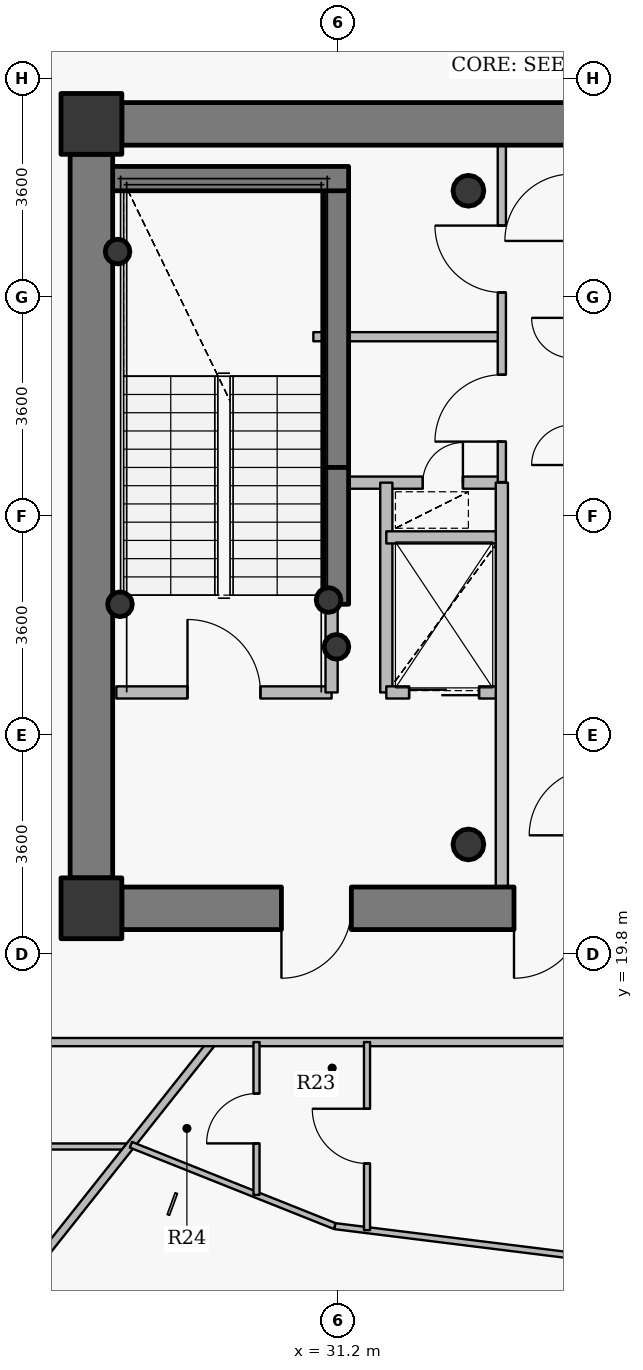
"""IFC4 building model, lengths in metres.
Left out: names, types, materials, properties, quantities, classifications, styles, units other than length and angle.
Written with IfcOpenShell. Run it as: python <this file> out.ifc"""

import sys

from ifc_helpers import new_model, si_unit, direction, frame, frame_2d, origin, origin_2d, place, context, subcontext, project, spatial, rectangle, hollow_circle, extrude, source, transform, mapped, element, fill, save


model = new_model("IFC4")
c1 = context("Model", 3, precision=1e-05, world=origin(), true_north=direction((0.0, 1.0)))
c2 = subcontext(c1, "Body", "Model", "MODEL_VIEW")
j1 = project(units=[si_unit("LENGTHUNIT", "METRE"), si_unit("PLANEANGLEUNIT", "RADIAN")], contexts=[c1])
p1 = place(None, origin())
s1 = spatial("IfcSite", under=j1, at=p1, CompositionType="ELEMENT")
p2 = place(p1, origin())
s2 = spatial("IfcBuilding", under=s1, at=p2, CompositionType="ELEMENT")
p3 = place(p2, frame((0.0, 0.0, 273.0)))
s3 = spatial("IfcBuildingStorey", under=s2, at=p3, CompositionType="ELEMENT", Elevation=273.0)
for number, where, z_axis, x_axis in (
    (1, (27.15, 20.55, 0.0), (0.0, 0.0, 1.0), (1.0, 0.0, 0.0)),
    (2, (27.15, 33.45, 0.0), (0.0, 0.0, 1.0), (1.0, 0.0, 0.0)),
):
    element("IfcColumn", number, at=place(p3, frame(where, z_axis=z_axis, x_axis=x_axis)), inside=s3, PredefinedType="COLUMN", context=c2, shape_type="SweptSolid", body=[
        extrude(rectangle(XDim=1.0, YDim=1.0, at=origin_2d()), origin(), (0.0, 0.0, 1.0), 3.75),
    ])
for number, where, z_axis, x_axis in (
    (3, (33.35, 21.6, 0.0), (0.0, 0.0, 1.0), (1.0, 0.0, 0.0)),
    (4, (33.35, 32.35, 0.0), (0.0, 0.0, 1.0), (1.0, 0.0, 0.0)),
):
    element("IfcColumn", number, at=place(p3, frame(where, z_axis=z_axis, x_axis=x_axis)), inside=s3, PredefinedType="COLUMN", context=c2, shape_type="SweptSolid", body=[
        extrude(hollow_circle(Radius=0.254, WallThickness=0.02, at=origin_2d()), origin(), (0.0, 0.0, 1.0), 3.75),
    ])
p4 = place(p3, frame((31.18, 27.8, 0.0), z_axis=(0.0, 0.0, 1.0), x_axis=(0.0, 1.0, 0.0)))
e5 = element("IfcWall", 5, at=p4, inside=s3, PredefinedType="SHEAR", context=c2, shape_type="SweptSolid", body=[
    extrude(rectangle(XDim=4.75, YDim=0.4, at=frame_2d((2.375, 0.0))), origin(), (0.0, 0.0, 1.0), 3.75),
])
p5 = place(p3, frame((27.25, 32.55, 0.0), z_axis=(0.0, 0.0, 1.0), x_axis=(1.0, 0.0, 0.0)))
e6 = element("IfcWall", 6, at=p5, inside=s3, PredefinedType="SHEAR", context=c2, shape_type="SweptSolid", body=[
    extrude(rectangle(XDim=4.13, YDim=0.4, at=frame_2d((2.065, 0.0))), origin(), (0.0, 0.0, 1.0), 3.75),
])
for number, where, z_axis, x_axis in (
    (7, (27.58, 31.35, 0.0), (0.0, 0.0, 1.0), (1.0, 0.0, 0.0)),
    (8, (31.05, 25.62, 0.0), (0.0, 0.0, 1.0), (1.0, 0.0, 0.0)),
    (9, (31.18, 24.85, 0.0), (0.0, 0.0, 1.0), (1.0, 0.0, 0.0)),
    (10, (27.62, 25.55, 0.0), (0.0, 0.0, 1.0), (1.0, 0.0, 0.0)),
):
    element("IfcColumn", number, at=place(p3, frame(where, z_axis=z_axis, x_axis=x_axis)), inside=s3, PredefinedType="COLUMN", context=c2, shape_type="SweptSolid", body=[
        extrude(hollow_circle(Radius=0.203, WallThickness=0.016, at=origin_2d()), origin(), (0.0, 0.0, 1.0), 3.75),
    ])
p6 = place(p3, frame((27.65, 33.45, 0.0), z_axis=(0.0, 0.0, 1.0), x_axis=(1.0, 0.0, 0.0)))
e11 = element("IfcWall", 11, at=p6, inside=s3, PredefinedType="SHEAR", context=c2, shape_type="SweptSolid", body=[
    extrude(rectangle(XDim=16.7, YDim=0.7, at=frame_2d((8.35, 0.0))), origin(), (0.0, 0.0, 1.0), 3.05),
])
p7 = place(p6, frame((12.775, 0.0, 0.0)))
e12 = element("IfcOpeningElement", 12, at=p7, cuts=e11, PredefinedType="OPENING", context=c2, shape_type="SweptSolid", body=[
    extrude(rectangle(XDim=1.15, YDim=2.15, at=origin_2d()), frame((0.575, 0.36, 1.075), z_axis=(0.0, -1.0, 0.0), x_axis=(1.0, 0.0, 0.0)), (0.0, 0.0, 1.0), 0.72),
])
p8 = place(p3, frame((44.35, 20.55, 0.0), z_axis=(0.0, 0.0, 1.0), x_axis=(-1.0, 0.0, 0.0)))
e13 = element("IfcWall", 13, at=p8, inside=s3, PredefinedType="SHEAR", context=c2, shape_type="SweptSolid", body=[
    extrude(rectangle(XDim=16.7, YDim=0.7, at=frame_2d((8.35, 0.0))), origin(), (0.0, 0.0, 1.0), 3.05),
])
p9 = place(p8, frame((12.925, 0.0, 0.0)))
e14 = element("IfcOpeningElement", 14, at=p9, cuts=e13, PredefinedType="OPENING", context=c2, shape_type="SweptSolid", body=[
    extrude(rectangle(XDim=1.15, YDim=2.15, at=origin_2d()), frame((0.575, 0.36, 1.075), z_axis=(0.0, -1.0, 0.0), x_axis=(1.0, 0.0, 0.0)), (0.0, 0.0, 1.0), 0.72),
])
p10 = place(p8, frame((9.1, 0.0, 0.0)))
e15 = element("IfcOpeningElement", 15, at=p10, cuts=e13, PredefinedType="OPENING", context=c2, shape_type="SweptSolid", body=[
    extrude(rectangle(XDim=1.15, YDim=2.15, at=origin_2d()), frame((0.575, 0.36, 1.075), z_axis=(0.0, -1.0, 0.0), x_axis=(1.0, 0.0, 0.0)), (0.0, 0.0, 1.0), 0.72),
])
p11 = place(p3, frame((27.15, 21.05, 0.0), z_axis=(0.0, 0.0, 1.0), x_axis=(0.0, 1.0, 0.0)))
e16 = element("IfcWall", 16, at=p11, inside=s3, PredefinedType="SHEAR", context=c2, shape_type="SweptSolid", body=[
    extrude(rectangle(XDim=11.9, YDim=0.7, at=frame_2d((5.95, 0.0))), origin(), (0.0, 0.0, 1.0), 3.05),
])
p12 = place(p3, frame((31.18, 25.55, 0.0), z_axis=(0.0, 0.0, 1.0), x_axis=(0.0, 1.0, 0.0)))
e17 = element("IfcWall", 17, at=p12, inside=s3, PredefinedType="SHEAR", context=c2, shape_type="SweptSolid", body=[
    extrude(rectangle(XDim=2.25, YDim=0.4, at=frame_2d((1.125, 0.0))), origin(), (0.0, 0.0, 1.0), 3.1),
])
p13 = place(p3, frame((18.118, 16.633, 0.0), z_axis=(0.0, 0.0, 1.0), x_axis=(1.0, 0.0, 0.0)))
e18 = element("IfcWall", 18, at=p13, inside=s3, PredefinedType="PARTITIONING", context=c2, shape_type="SweptSolid", body=[
    extrude(rectangle(XDim=9.659, YDim=0.1, at=frame_2d((4.83, 0.0))), origin(), (0.0, 0.0, 1.0), 2.985),
])
p14 = place(p13, frame((4.379, 0.0, 0.0)))
e19 = element("IfcOpeningElement", 19, at=p14, cuts=e18, PredefinedType="OPENING", context=c2, shape_type="SweptSolid", body=[
    extrude(rectangle(XDim=0.9, YDim=2.1, at=origin_2d()), frame((0.45, 0.06, 1.05), z_axis=(0.0, -1.0, 0.0), x_axis=(1.0, 0.0, 0.0)), (0.0, 0.0, 1.0), 0.12),
])
p15 = place(p3, frame((24.294, 12.242, 0.0), z_axis=(0.0, 0.0, 1.0), x_axis=(0.621439784824, 0.783461928774, 0.0)))
e20 = element("IfcWall", 20, at=p15, inside=s3, PredefinedType="PARTITIONING", context=c2, shape_type="SweptSolid", body=[
    extrude(rectangle(XDim=7.796, YDim=0.135, at=frame_2d((3.898, 0.0))), origin(), (0.0, 0.0, 1.0), 2.985),
])
p16 = place(p3, frame((24.95, 18.35, 0.0), z_axis=(0.0, 0.0, 1.0), x_axis=(1.0, 0.0, 0.0)))
e21 = element("IfcWall", 21, at=p16, inside=s3, PredefinedType="PARTITIONING", context=c2, shape_type="SweptSolid", body=[
    extrude(rectangle(XDim=10.1, YDim=0.135, at=frame_2d((5.05, 0.0))), origin(), (0.0, 0.0, 1.0), 3.035),
])
p17 = place(p3, frame((27.56, 24.1, 0.0), z_axis=(0.0, 0.0, 1.0), x_axis=(1.0, 0.0, 0.0)))
e22 = element("IfcWall", 22, at=p17, inside=s3, PredefinedType="PARTITIONING", context=c2, shape_type="SweptSolid", body=[
    extrude(rectangle(XDim=3.54, YDim=0.2, at=frame_2d((1.77, 0.0))), origin(), (0.0, 0.0, 1.0), 3.5),
])
p18 = place(p17, frame((1.17, 0.0, 0.0)))
e23 = element("IfcOpeningElement", 23, at=p18, cuts=e22, PredefinedType="OPENING", context=c2, shape_type="SweptSolid", body=[
    extrude(rectangle(XDim=1.2, YDim=2.15, at=origin_2d()), frame((0.6, 0.11, 1.075), z_axis=(0.0, -1.0, 0.0), x_axis=(1.0, 0.0, 0.0)), (0.0, 0.0, 1.0), 0.22),
])
p19 = place(p3, frame((27.8, 16.662, 0.0), z_axis=(0.0, 0.0, 1.0), x_axis=(0.928783988526, -0.370621508628, 0.0)))
e24 = element("IfcWall", 24, at=p19, inside=s3, PredefinedType="PARTITIONING", context=c2, shape_type="SweptSolid", body=[
    extrude(rectangle(XDim=3.613, YDim=0.1, at=frame_2d((1.806, 0.0))), origin(), (0.0, 0.0, 1.0), 3.035),
])
p20 = place(p3, frame((29.865, 15.837, 0.0), z_axis=(0.0, 0.0, 1.0), x_axis=(0.0, 1.0, 0.0)))
e25 = element("IfcWall", 25, at=p20, inside=s3, PredefinedType="PARTITIONING", context=c2, shape_type="SweptSolid", body=[
    extrude(rectangle(XDim=2.513, YDim=0.1, at=frame_2d((1.256, 0.0))), origin(), (0.0, 0.0, 1.0), 3.035),
])
p21 = place(p20, frame((0.846, 0.0, 0.0)))
e26 = element("IfcOpeningElement", 26, at=p21, cuts=e25, PredefinedType="OPENING", context=c2, shape_type="SweptSolid", body=[
    extrude(rectangle(XDim=0.82, YDim=2.1, at=origin_2d()), frame((0.41, 0.06, 1.05), z_axis=(0.0, -1.0, 0.0), x_axis=(1.0, 0.0, 0.0)), (0.0, 0.0, 1.0), 0.12),
])
p22 = place(p3, frame((30.8, 29.95, 0.0), z_axis=(0.0, 0.0, 1.0), x_axis=(1.0, 0.0, 0.0)))
e27 = element("IfcWall", 27, at=p22, inside=s3, PredefinedType="PARTITIONING", context=c2, shape_type="SweptSolid", body=[
    extrude(rectangle(XDim=3.1, YDim=0.15, at=frame_2d((1.55, 0.0))), origin(), (0.0, 0.0, 1.0), 3.085),
])
p23 = place(p3, frame((31.1, 24.1, 0.0), z_axis=(0.0, 0.0, 1.0), x_axis=(0.0, 1.0, 0.0)))
e28 = element("IfcWall", 28, at=p23, inside=s3, PredefinedType="PARTITIONING", context=c2, shape_type="SweptSolid", body=[
    extrude(rectangle(XDim=1.44, YDim=0.2, at=frame_2d((0.72, 0.0))), origin(), (0.0, 0.0, 1.0), 3.5),
])
p24 = place(p3, frame((31.1, 27.55, 0.0), z_axis=(0.0, 0.0, 1.0), x_axis=(1.0, 0.0, 0.0)))
e29 = element("IfcWall", 29, at=p24, inside=s3, PredefinedType="PARTITIONING", context=c2, shape_type="SweptSolid", body=[
    extrude(rectangle(XDim=2.8, YDim=0.2, at=frame_2d((1.4, 0.0))), origin(), (0.0, 0.0, 1.0), 3.085),
])
p25 = place(p24, frame((1.5, 0.0, 0.0)))
e30 = element("IfcOpeningElement", 30, at=p25, cuts=e29, PredefinedType="OPENING", context=c2, shape_type="SweptSolid", body=[
    extrude(rectangle(XDim=0.66, YDim=2.05, at=origin_2d()), frame((0.33, 0.11, 1.025), z_axis=(0.0, -1.0, 0.0), x_axis=(1.0, 0.0, 0.0)), (0.0, 0.0, 1.0), 0.22),
])
p26 = place(p3, frame((31.155, 15.323, 0.0), z_axis=(0.0, 0.0, 1.0), x_axis=(0.992397939869, -0.123070422704, 0.0)))
e31 = element("IfcWall", 31, at=p26, inside=s3, PredefinedType="PARTITIONING", context=c2, shape_type="SweptSolid", body=[
    extrude(rectangle(XDim=3.958, YDim=0.1, at=frame_2d((1.979, 0.0))), origin(), (0.0, 0.0, 1.0), 3.5),
])
p27 = place(p3, frame((31.683, 15.258, 0.0), z_axis=(0.0, 0.0, 1.0), x_axis=(0.0, 1.0, 0.0)))
e32 = element("IfcWall", 32, at=p27, inside=s3, PredefinedType="PARTITIONING", context=c2, shape_type="SweptSolid", body=[
    extrude(rectangle(XDim=3.093, YDim=0.1, at=frame_2d((1.546, 0.0))), origin(), (0.0, 0.0, 1.0), 3.5),
])
p28 = place(p27, frame((1.096, 0.0, 0.0)))
e33 = element("IfcOpeningElement", 33, at=p28, cuts=e32, PredefinedType="OPENING", context=c2, shape_type="SweptSolid", body=[
    extrude(rectangle(XDim=0.9, YDim=2.1, at=origin_2d()), frame((0.45, 0.06, 1.05), z_axis=(0.0, -1.0, 0.0), x_axis=(1.0, 0.0, 0.0)), (0.0, 0.0, 1.0), 0.12),
])
p29 = place(p3, frame((32.0, 24.1, 0.0), z_axis=(0.0, 0.0, 1.0), x_axis=(0.0, 1.0, 0.0)))
e34 = element("IfcWall", 34, at=p29, inside=s3, PredefinedType="PARTITIONING", context=c2, shape_type="SweptSolid", body=[
    extrude(rectangle(XDim=3.45, YDim=0.2, at=frame_2d((1.725, 0.0))), origin(), (0.0, 0.0, 1.0), 3.5),
])
p30 = place(p3, frame((32.0, 24.1, 0.0), z_axis=(0.0, 0.0, 1.0), x_axis=(1.0, 0.0, 0.0)))
e35 = element("IfcWall", 35, at=p30, inside=s3, PredefinedType="PARTITIONING", context=c2, shape_type="SweptSolid", body=[
    extrude(rectangle(XDim=1.9, YDim=0.2, at=frame_2d((0.95, 0.0))), origin(), (0.0, 0.0, 1.0), 3.085),
])
p31 = place(p30, frame((0.375, 0.0, 0.0)))
e36 = element("IfcOpeningElement", 36, at=p31, cuts=e35, PredefinedType="OPENING", context=c2, shape_type="SweptSolid", body=[
    extrude(rectangle(XDim=1.15, YDim=2.15, at=origin_2d()), frame((0.575, 0.11, 1.075), z_axis=(0.0, -1.0, 0.0), x_axis=(1.0, 0.0, 0.0)), (0.0, 0.0, 1.0), 0.22),
])
p32 = place(p3, frame((32.0, 26.65, 0.0), z_axis=(0.0, 0.0, 1.0), x_axis=(1.0, 0.0, 0.0)))
e37 = element("IfcWall", 37, at=p32, inside=s3, PredefinedType="PARTITIONING", context=c2, shape_type="SweptSolid", body=[
    extrude(rectangle(XDim=1.9, YDim=0.2, at=frame_2d((0.95, 0.0))), origin(), (0.0, 0.0, 1.0), 3.085),
])
p33 = place(p3, frame((33.9, 20.9, 0.0), z_axis=(0.0, 0.0, 1.0), x_axis=(0.0, 1.0, 0.0)))
e38 = element("IfcWall", 38, at=p33, inside=s3, PredefinedType="PARTITIONING", context=c2, shape_type="SweptSolid", body=[
    extrude(rectangle(XDim=6.65, YDim=0.2, at=frame_2d((3.325, 0.0))), origin(), (0.0, 0.0, 1.0), 3.085),
])
p34 = place(p3, frame((33.9, 27.56, 0.0), z_axis=(0.0, 0.0, 1.0), x_axis=(0.0, 1.0, 0.0)))
e39 = element("IfcWall", 39, at=p34, inside=s3, PredefinedType="PARTITIONING", context=c2, shape_type="SweptSolid", body=[
    extrude(rectangle(XDim=5.54, YDim=0.135, at=frame_2d((2.77, 0.0))), origin(), (0.0, 0.0, 1.0), 3.085),
])
p35 = place(p34, frame((0.665, 0.0, 0.0)))
e40 = element("IfcOpeningElement", 40, at=p35, cuts=e39, PredefinedType="OPENING", context=c2, shape_type="SweptSolid", body=[
    extrude(rectangle(XDim=1.1, YDim=2.15, at=origin_2d()), frame((0.55, 0.078, 1.075), z_axis=(0.0, -1.0, 0.0), x_axis=(1.0, 0.0, 0.0)), (0.0, 0.0, 1.0), 0.155),
])
p36 = place(p34, frame((3.117, 0.0, 0.0)))
e41 = element("IfcOpeningElement", 41, at=p36, cuts=e39, PredefinedType="OPENING", context=c2, shape_type="SweptSolid", body=[
    extrude(rectangle(XDim=1.1, YDim=2.15, at=origin_2d()), frame((0.55, 0.078, 1.075), z_axis=(0.0, -1.0, 0.0), x_axis=(1.0, 0.0, 0.0)), (0.0, 0.0, 1.0), 0.155),
])
p37 = place(p3, frame((34.691, 9.661, 0.0), z_axis=(0.0, 0.0, 1.0), x_axis=(0.0752647297, 0.997163587614, 0.0)))
e42 = element("IfcWall", 42, at=p37, inside=s3, PredefinedType="PARTITIONING", context=c2, shape_type="SweptSolid", body=[
    extrude(rectangle(XDim=5.19, YDim=0.1, at=frame_2d((2.595, 0.0))), origin(), (0.0, 0.0, 1.0), 2.985),
])
p38 = place(p37, frame((2.145, 0.0, 0.0)))
e43 = element("IfcOpeningElement", 43, at=p38, cuts=e42, PredefinedType="OPENING", context=c2, shape_type="SweptSolid", body=[
    extrude(rectangle(XDim=0.9, YDim=2.1, at=origin_2d()), frame((0.45, 0.06, 1.05), z_axis=(0.0, -1.0, 0.0), x_axis=(1.0, 0.0, 0.0)), (0.0, 0.0, 1.0), 0.12),
])
p39 = place(p3, frame((27.64, 33.8, 0.0), z_axis=(0.0, 0.0, 1.0), x_axis=(-1.0, 0.0, 0.0)))
e44 = element("IfcWall", 44, at=p39, inside=s3, PredefinedType="PARTITIONING", context=c2, shape_type="SweptSolid", body=[
    extrude(rectangle(XDim=0.84, YDim=0.135, at=frame_2d((0.42, 0.0))), origin(), (0.0, 0.0, 1.0), 3.035),
])
p40 = place(p3, frame((26.8, 33.492, 0.0), z_axis=(0.0, 0.0, 1.0), x_axis=(0.0, -1.0, 0.0)))
e45 = element("IfcWall", 45, at=p40, inside=s3, PredefinedType="PARTITIONING", context=c2, shape_type="SweptSolid", body=[
    extrude(rectangle(XDim=0.532, YDim=0.135, at=frame_2d((0.266, 0.0))), origin(), (0.0, 0.0, 1.0), 3.5),
])
p41 = place(p3, frame((26.8, 21.04, 0.0), z_axis=(0.0, 0.0, 1.0), x_axis=(0.0, -1.0, 0.0)))
e46 = element("IfcWall", 46, at=p41, inside=s3, PredefinedType="PARTITIONING", context=c2, shape_type="SweptSolid", body=[
    extrude(rectangle(XDim=0.84, YDim=0.135, at=frame_2d((0.42, 0.0))), origin(), (0.0, 0.0, 1.0), 3.035),
])
p42 = place(p3, frame((27.107, 20.2, 0.0), z_axis=(0.0, 0.0, 1.0), x_axis=(1.0, 0.0, 0.0)))
e47 = element("IfcWall", 47, at=p42, inside=s3, PredefinedType="PARTITIONING", context=c2, shape_type="SweptSolid", body=[
    extrude(rectangle(XDim=0.532, YDim=0.135, at=frame_2d((0.266, 0.0))), origin(), (0.0, 0.0, 1.0), 3.035),
])
m1 = source(origin(), c2, "Body", "SweptSolid", [
    extrude(rectangle(XDim=1.15, YDim=2.15, at=origin_2d()), frame((0.575, 0.025, 1.075), z_axis=(0.0, -1.0, 0.0), x_axis=(1.0, 0.0, 0.0)), (0.0, 0.0, 1.0), 0.05),
])
p43 = place(p9, origin())
e48 = element("IfcDoor", 48, at=p43, inside=s3, OperationType="SINGLE_SWING_RIGHT", PredefinedType="DOOR", context=c2, shape_type="MappedRepresentation", body=[
    mapped(m1, transform((0.0, 0.0, 0.0), x_axis=(1.0, 0.0, 0.0), y_axis=(0.0, 1.0, 0.0), z_axis=(0.0, 0.0, 1.0), scale=1.0)),
])
fill(e14, e48)
p44 = place(p10, origin())
e49 = element("IfcDoor", 49, at=p44, inside=s3, OperationType="SINGLE_SWING_RIGHT", PredefinedType="DOOR", context=c2, shape_type="MappedRepresentation", body=[
    mapped(m1, transform((0.0, 0.0, 0.0), x_axis=(1.0, 0.0, 0.0), y_axis=(0.0, 1.0, 0.0), z_axis=(0.0, 0.0, 1.0), scale=1.0)),
])
fill(e15, e49)
m2 = source(origin(), c2, "Body", "SweptSolid", [
    extrude(rectangle(XDim=1.2, YDim=2.15, at=origin_2d()), frame((0.6, 0.025, 1.075), z_axis=(0.0, -1.0, 0.0), x_axis=(1.0, 0.0, 0.0)), (0.0, 0.0, 1.0), 0.05),
])
p45 = place(p18, origin())
e50 = element("IfcDoor", 50, at=p45, inside=s3, OperationType="SINGLE_SWING_LEFT", PredefinedType="DOOR", context=c2, shape_type="MappedRepresentation", body=[
    mapped(m2, transform((0.0, 0.0, 0.0), x_axis=(1.0, 0.0, 0.0), y_axis=(0.0, 1.0, 0.0), z_axis=(0.0, 0.0, 1.0), scale=1.0)),
])
fill(e23, e50)
m3 = source(origin(), c2, "Body", "SweptSolid", [
    extrude(rectangle(XDim=1.15, YDim=2.15, at=origin_2d()), frame((0.575, 0.025, 1.075), z_axis=(0.0, -1.0, 0.0), x_axis=(1.0, 0.0, 0.0)), (0.0, 0.0, 1.0), 0.05),
])
p46 = place(p31, origin())
e51 = element("IfcDoor", 51, at=p46, inside=s3, OperationType="DOUBLE_DOOR_SLIDING", PredefinedType="USERDEFINED", context=c2, shape_type="MappedRepresentation", body=[
    mapped(m3, transform((0.0, 0.0, 0.0), x_axis=(1.0, 0.0, 0.0), y_axis=(0.0, 1.0, 0.0), z_axis=(0.0, 0.0, 1.0), scale=1.0)),
])
fill(e36, e51)
m4 = source(origin(), c2, "Body", "SweptSolid", [
    extrude(rectangle(XDim=0.9, YDim=2.1, at=origin_2d()), frame((0.45, 0.025, 1.05), z_axis=(0.0, -1.0, 0.0), x_axis=(1.0, 0.0, 0.0)), (0.0, 0.0, 1.0), 0.05),
])
p47 = place(p28, origin())
e52 = element("IfcDoor", 52, at=p47, inside=s3, OperationType="SINGLE_SWING_RIGHT", PredefinedType="DOOR", context=c2, shape_type="MappedRepresentation", body=[
    mapped(m4, transform((0.0, 0.0, 0.0), x_axis=(1.0, 0.0, 0.0), y_axis=(0.0, 1.0, 0.0), z_axis=(0.0, 0.0, 1.0), scale=1.0)),
])
fill(e33, e52)
m5 = source(origin(), c2, "Body", "SweptSolid", [
    extrude(rectangle(XDim=0.82, YDim=2.1, at=origin_2d()), frame((0.41, 0.025, 1.05), z_axis=(0.0, -1.0, 0.0), x_axis=(1.0, 0.0, 0.0)), (0.0, 0.0, 1.0), 0.05),
])
p48 = place(p21, origin())
e53 = element("IfcDoor", 53, at=p48, inside=s3, OperationType="SINGLE_SWING_LEFT", PredefinedType="DOOR", context=c2, shape_type="MappedRepresentation", body=[
    mapped(m5, transform((0.0, 0.0, 0.0), x_axis=(1.0, 0.0, 0.0), y_axis=(0.0, 1.0, 0.0), z_axis=(0.0, 0.0, 1.0), scale=1.0)),
])
fill(e26, e53)
m6 = source(origin(), c2, "Body", "SweptSolid", [
    extrude(rectangle(XDim=1.1, YDim=2.15, at=origin_2d()), frame((0.55, 0.025, 1.075), z_axis=(0.0, -1.0, 0.0), x_axis=(1.0, 0.0, 0.0)), (0.0, 0.0, 1.0), 0.05),
])
p49 = place(p35, origin())
e54 = element("IfcDoor", 54, at=p49, inside=s3, OperationType="SINGLE_SWING_LEFT", PredefinedType="DOOR", context=c2, shape_type="MappedRepresentation", body=[
    mapped(m6, transform((0.0, 0.0, 0.0), x_axis=(1.0, 0.0, 0.0), y_axis=(0.0, 1.0, 0.0), z_axis=(0.0, 0.0, 1.0), scale=1.0)),
])
fill(e40, e54)
p50 = place(p36, origin())
e55 = element("IfcDoor", 55, at=p50, inside=s3, OperationType="SINGLE_SWING_RIGHT", PredefinedType="DOOR", context=c2, shape_type="MappedRepresentation", body=[
    mapped(m6, transform((0.0, 0.0, 0.0), x_axis=(1.0, 0.0, 0.0), y_axis=(0.0, 1.0, 0.0), z_axis=(0.0, 0.0, 1.0), scale=1.0)),
])
fill(e41, e55)
m7 = source(origin(), c2, "Body", "SweptSolid", [
    extrude(rectangle(XDim=0.66, YDim=2.05, at=origin_2d()), frame((0.33, 0.025, 1.025), z_axis=(0.0, -1.0, 0.0), x_axis=(1.0, 0.0, 0.0)), (0.0, 0.0, 1.0), 0.05),
])
p51 = place(p25, origin())
e56 = element("IfcDoor", 56, at=p51, inside=s3, OperationType="SINGLE_SWING_RIGHT", PredefinedType="USERDEFINED", context=c2, shape_type="MappedRepresentation", body=[
    mapped(m7, transform((0.0, 0.0, 0.0), x_axis=(1.0, 0.0, 0.0), y_axis=(0.0, 1.0, 0.0), z_axis=(0.0, 0.0, 1.0), scale=1.0)),
])
fill(e30, e56)
save(model, sys.argv[1])
